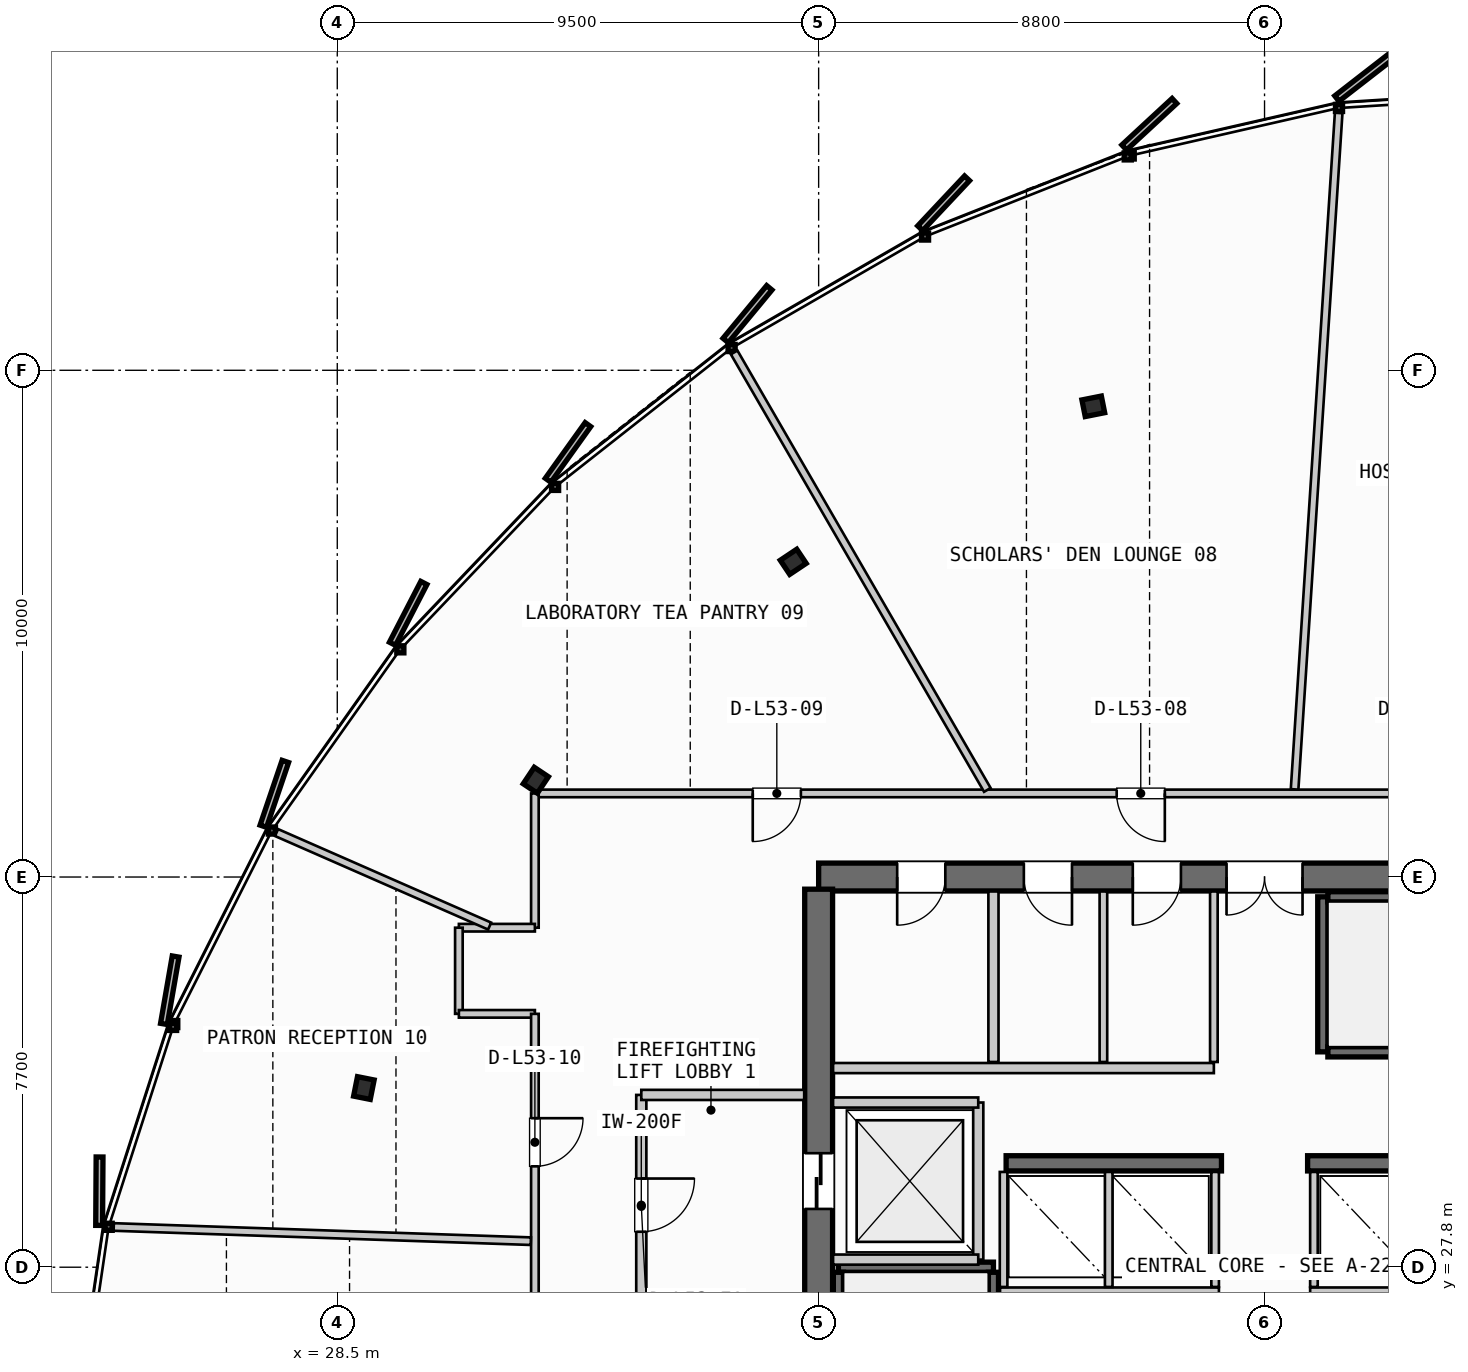
"""IFC4 building model, lengths in metres.
Left out: names, types, materials, properties, quantities, classifications, styles, units other than length and angle.
Written with IfcOpenShell. Run it as: python <this file> out.ifc"""

import sys

from ifc_helpers import new_model, si_unit, direction, frame, frame_2d, origin, origin_2d, place, context, subcontext, project, spatial, rectangle, i_section, extrude, source, transform, mapped, element, fill, save


model = new_model("IFC4")
c1 = context("Model", 3, precision=1e-05, world=origin(), true_north=direction((0.0, 1.0)))
c2 = subcontext(c1, "Body", "Model", "MODEL_VIEW")
j1 = project(units=[si_unit("LENGTHUNIT", "METRE"), si_unit("PLANEANGLEUNIT", "RADIAN")], contexts=[c1])
p1 = place(None, origin())
s1 = spatial("IfcSite", under=j1, at=p1, CompositionType="ELEMENT")
p2 = place(p1, origin())
s2 = spatial("IfcBuilding", under=s1, at=p2, CompositionType="ELEMENT")
p3 = place(p2, frame((0.0, 0.0, 204.4)))
s3 = spatial("IfcBuildingStorey", under=s2, at=p3, CompositionType="ELEMENT", Elevation=204.4)
p4 = place(p3, frame((55.6, 35.5, 0.0), z_axis=(0.0, 0.0, 1.0), x_axis=(-1.0, 0.0, 0.0)))
e1 = element("IfcWall", 1, at=p4, inside=s3, PredefinedType="SHEAR", context=c2, shape_type="SweptSolid", body=[
    extrude(rectangle(XDim=17.6, YDim=0.55, at=frame_2d((8.8, 0.0))), origin(), (0.0, 0.0, 1.0), 3.26),
])
p5 = place(p4, frame((8.05, 0.0, 0.0)))
e2 = element("IfcOpeningElement", 2, at=p5, cuts=e1, PredefinedType="OPENING", context=c2, shape_type="SweptSolid", body=[
    extrude(rectangle(XDim=1.5, YDim=2.2, at=frame_2d((0.75, 1.1))), frame((0.0, 0.285, 0.0), z_axis=(0.0, -1.0, 0.0), x_axis=(1.0, 0.0, 0.0)), (0.0, 0.0, 1.0), 0.57),
])
p6 = place(p4, frame((15.1, 0.0, 0.0)))
e3 = element("IfcOpeningElement", 3, at=p6, cuts=e1, PredefinedType="OPENING", context=c2, shape_type="SweptSolid", body=[
    extrude(rectangle(XDim=0.95, YDim=2.15, at=frame_2d((0.475, 1.075))), frame((0.0, 0.285, 0.0), z_axis=(0.0, -1.0, 0.0), x_axis=(1.0, 0.0, 0.0)), (0.0, 0.0, 1.0), 0.57),
])
p7 = place(p4, frame((12.6, 0.0, 0.0)))
e4 = element("IfcOpeningElement", 4, at=p7, cuts=e1, PredefinedType="OPENING", context=c2, shape_type="SweptSolid", body=[
    extrude(rectangle(XDim=0.95, YDim=2.15, at=frame_2d((0.475, 1.075))), frame((0.0, 0.285, 0.0), z_axis=(0.0, -1.0, 0.0), x_axis=(1.0, 0.0, 0.0)), (0.0, 0.0, 1.0), 0.57),
])
p8 = place(p4, frame((10.45, 0.0, 0.0)))
e5 = element("IfcOpeningElement", 5, at=p8, cuts=e1, PredefinedType="OPENING", context=c2, shape_type="SweptSolid", body=[
    extrude(rectangle(XDim=0.95, YDim=2.15, at=frame_2d((0.475, 1.075))), frame((0.0, 0.285, 0.0), z_axis=(0.0, -1.0, 0.0), x_axis=(1.0, 0.0, 0.0)), (0.0, 0.0, 1.0), 0.57),
])
p9 = place(p3, frame((38.0, 35.26, 0.0), z_axis=(0.0, 0.0, 1.0), x_axis=(0.0, -1.0, 0.0)))
e6 = element("IfcWall", 6, at=p9, inside=s3, PredefinedType="SHEAR", context=c2, shape_type="SweptSolid", body=[
    extrude(rectangle(XDim=14.92, YDim=0.55, at=frame_2d((7.46, 0.0))), origin(), (0.0, 0.0, 1.0), 3.26),
])
p10 = place(p9, frame((5.21, 0.0, 0.0)))
e7 = element("IfcOpeningElement", 7, at=p10, cuts=e6, PredefinedType="OPENING", context=c2, shape_type="SweptSolid", body=[
    extrude(rectangle(XDim=1.1, YDim=2.2, at=frame_2d((0.55, 1.1))), frame((0.0, 0.285, 0.0), z_axis=(0.0, -1.0, 0.0), x_axis=(1.0, 0.0, 0.0)), (0.0, 0.0, 1.0), 0.57),
])
for number, where, z_axis, x_axis in (
    (8, (41.7, 29.85, 0.0), (0.0, 0.0, 1.0), (1.0, 0.0, 0.0)),
    (9, (47.65, 29.85, 0.0), (0.0, 0.0, 1.0), (1.0, 0.0, 0.0)),
):
    element("IfcWall", number, at=place(p3, frame(where, z_axis=z_axis, x_axis=x_axis)), inside=s3, PredefinedType="SHEAR", context=c2, shape_type="SweptSolid", body=[
        extrude(rectangle(XDim=4.25, YDim=0.3, at=frame_2d((2.125, 0.0))), origin(), (0.0, 0.0, 1.0), 3.26),
    ])
m1 = source(origin(), c2, "Body", "SweptSolid", [
    extrude(i_section(OverallWidth=0.391, OverallDepth=0.335, WebThickness=0.023, FlangeThickness=0.034, FilletRadius=0.015, at=origin_2d()), origin(), (0.0, 0.0, 1.0), 3.26),
])
for number, where, z_axis, x_axis in (
    (10, (43.421, 44.789, 0.0), (0.0, 0.0, 1.0), (-0.195, 0.981, 0.0)),
    (11, (37.499, 41.72, 0.0), (0.0, 0.0, 1.0), (-0.556, 0.831, 0.0)),
    (12, (32.418, 37.409, 0.0), (0.0, 0.0, 1.0), (-0.831, 0.556, 0.0)),
    (13, (29.025, 31.336, 0.0), (0.0, 0.0, 1.0), (-0.981, 0.195, 0.0)),
):
    element("IfcColumn", number, at=place(p3, frame(where, z_axis=z_axis, x_axis=x_axis)), inside=s3, PredefinedType="COLUMN", context=c2, shape_type="MappedRepresentation", body=[
        mapped(m1, transform((0.0, 0.0, 0.0), scale=1.0)),
    ])
p11 = place(p3, frame((38.39, 27.8, 0.0), z_axis=(0.0, 0.0, 1.0), x_axis=(1.0, 0.0, 0.0)))
e14 = element("IfcWall", 14, at=p11, inside=s3, PredefinedType="SHEAR", context=c2, shape_type="SweptSolid", body=[
    extrude(rectangle(XDim=3.06, YDim=0.2, at=frame_2d((1.53, 0.0))), origin(), (0.0, 0.0, 1.0), 3.26),
])
for number, where, z_axis, x_axis in (
    (15, (41.45, 27.7, 0.0), (0.0, 0.0, 1.0), (0.0, -1.0, 0.0)),
    (16, (38.39, 20.35, 0.0), (0.0, 0.0, 1.0), (0.0, 1.0, 0.0)),
):
    element("IfcWall", number, at=place(p3, frame(where, z_axis=z_axis, x_axis=x_axis)), inside=s3, PredefinedType="SHEAR", context=c2, shape_type="SweptSolid", body=[
        extrude(rectangle(XDim=7.35, YDim=0.2, at=frame_2d((3.675, 0.0))), origin(), (0.0, 0.0, 1.0), 3.26),
    ])
p12 = place(p3, frame((47.95, 32.05, 0.0), z_axis=(0.0, 0.0, 1.0), x_axis=(0.0, 1.0, 0.0)))
e17 = element("IfcWall", 17, at=p12, inside=s3, PredefinedType="SHEAR", context=c2, shape_type="SweptSolid", body=[
    extrude(rectangle(XDim=3.06, YDim=0.2, at=frame_2d((1.53, 0.0))), origin(), (0.0, 0.0, 1.0), 3.26),
])
for number, where, z_axis, x_axis in (
    (18, (48.05, 35.11, 0.0), (0.0, 0.0, 1.0), (1.0, 0.0, 0.0)),
    (19, (55.4, 32.05, 0.0), (0.0, 0.0, 1.0), (-1.0, 0.0, 0.0)),
):
    element("IfcWall", number, at=place(p3, frame(where, z_axis=z_axis, x_axis=x_axis)), inside=s3, PredefinedType="SHEAR", context=c2, shape_type="SweptSolid", body=[
        extrude(rectangle(XDim=7.35, YDim=0.2, at=frame_2d((3.675, 0.0))), origin(), (0.0, 0.0, 1.0), 3.26),
    ])
p13 = place(p3, frame((41.15, 27.95, 0.0), z_axis=(0.0, 0.0, 1.0), x_axis=(0.0, 1.0, 0.0)))
e20 = element("IfcWall", 20, at=p13, inside=s3, PredefinedType="PARTITIONING", context=c2, shape_type="SweptSolid", body=[
    extrude(rectangle(XDim=3.1, YDim=0.2, at=frame_2d((1.55, 0.0))), origin(), (0.0, 0.0, 1.0), 2.595),
])
for number, where, z_axis, x_axis in (
    (21, (38.285, 27.95, 0.0), (0.0, 0.0, 1.0), (1.0, 0.0, 0.0)),
    (22, (38.285, 31.05, 0.0), (0.0, 0.0, 1.0), (1.0, 0.0, 0.0)),
):
    element("IfcWall", number, at=place(p3, frame(where, z_axis=z_axis, x_axis=x_axis)), inside=s3, PredefinedType="PARTITIONING", context=c2, shape_type="SweptSolid", body=[
        extrude(rectangle(XDim=2.865, YDim=0.2, at=frame_2d((1.433, 0.0))), origin(), (0.0, 0.0, 1.0), 2.595),
    ])
p14 = place(p3, frame((34.5, 31.2, 0.0), z_axis=(0.0, 0.0, 1.0), x_axis=(0.0, -1.0, 0.0)))
e23 = element("IfcWall", 23, at=p14, inside=s3, PredefinedType="PARTITIONING", context=c2, shape_type="SweptSolid", body=[
    extrude(rectangle(XDim=4.4, YDim=0.2, at=frame_2d((2.2, 0.0))), origin(), (0.0, 0.0, 1.0), 2.595),
])
p15 = place(p14, frame((1.65, 0.0, 0.0)))
e24 = element("IfcOpeningElement", 24, at=p15, cuts=e23, PredefinedType="OPENING", context=c2, shape_type="SweptSolid", body=[
    extrude(rectangle(XDim=1.05, YDim=2.15, at=frame_2d((0.525, 1.075))), frame((0.0, 0.11, 0.0), z_axis=(0.0, -1.0, 0.0), x_axis=(1.0, 0.0, 0.0)), (0.0, 0.0, 1.0), 0.22),
])
p16 = place(p3, frame((34.5, 31.2, 0.0), z_axis=(0.0, 0.0, 1.0), x_axis=(1.0, 0.0, 0.0)))
e25 = element("IfcWall", 25, at=p16, inside=s3, PredefinedType="PARTITIONING", context=c2, shape_type="SweptSolid", body=[
    extrude(rectangle(XDim=3.215, YDim=0.2, at=frame_2d((1.607, 0.0))), origin(), (0.0, 0.0, 1.0), 2.595),
])
p17 = place(p3, frame((41.58, 27.325, 0.0), z_axis=(0.0, 0.0, 1.0), x_axis=(1.0, 0.0, 0.0)))
e26 = element("IfcWall", 26, at=p17, inside=s3, PredefinedType="PARTITIONING", context=c2, shape_type="SweptSolid", body=[
    extrude(rectangle(XDim=4.32, YDim=0.15, at=frame_2d((2.16, 0.0))), origin(), (0.0, 0.0, 1.0), 2.595),
])
p18 = place(p3, frame((47.7, 27.325, 0.0), z_axis=(0.0, 0.0, 1.0), x_axis=(1.0, 0.0, 0.0)))
e27 = element("IfcWall", 27, at=p18, inside=s3, PredefinedType="PARTITIONING", context=c2, shape_type="SweptSolid", body=[
    extrude(rectangle(XDim=4.32, YDim=0.15, at=frame_2d((2.16, 0.0))), origin(), (0.0, 0.0, 1.0), 2.595),
])
for number, where, z_axis, x_axis in (
    (28, (41.65, 27.41, 0.0), (0.0, 0.0, 1.0), (0.0, 1.0, 0.0)),
    (29, (43.725, 27.41, 0.0), (0.0, 0.0, 1.0), (0.0, 1.0, 0.0)),
    (30, (45.825, 27.41, 0.0), (0.0, 0.0, 1.0), (0.0, 1.0, 0.0)),
    (31, (47.775, 27.41, 0.0), (0.0, 0.0, 1.0), (0.0, 1.0, 0.0)),
):
    element("IfcWall", number, at=place(p3, frame(where, z_axis=z_axis, x_axis=x_axis)), inside=s3, PredefinedType="PARTITIONING", context=c2, shape_type="SweptSolid", body=[
        extrude(rectangle(XDim=2.27, YDim=0.15, at=frame_2d((1.135, 0.0))), origin(), (0.0, 0.0, 1.0), 2.595),
    ])
p19 = place(p3, frame((41.45, 31.85, 0.0), z_axis=(0.0, 0.0, 1.0), x_axis=(0.0, 1.0, 0.0)))
e32 = element("IfcWall", 32, at=p19, inside=s3, PredefinedType="PARTITIONING", context=c2, shape_type="SweptSolid", body=[
    extrude(rectangle(XDim=3.365, YDim=0.2, at=frame_2d((1.683, 0.0))), origin(), (0.0, 0.0, 1.0), 2.595),
])
p20 = place(p3, frame((38.285, 31.73, 0.0), z_axis=(0.0, 0.0, 1.0), x_axis=(1.0, 0.0, 0.0)))
e33 = element("IfcWall", 33, at=p20, inside=s3, PredefinedType="PARTITIONING", context=c2, shape_type="SweptSolid", body=[
    extrude(rectangle(XDim=7.515, YDim=0.2, at=frame_2d((3.758, 0.0))), origin(), (0.0, 0.0, 1.0), 2.595),
])
p21 = place(p3, frame((45.8, 31.85, 0.0), z_axis=(0.0, 0.0, 1.0), x_axis=(0.0, 1.0, 0.0)))
e34 = element("IfcWall", 34, at=p21, inside=s3, PredefinedType="PARTITIONING", context=c2, shape_type="SweptSolid", body=[
    extrude(rectangle(XDim=3.365, YDim=0.15, at=frame_2d((1.683, 0.0))), origin(), (0.0, 0.0, 1.0), 2.595),
])
p22 = place(p3, frame((43.62, 31.85, 0.0), z_axis=(0.0, 0.0, 1.0), x_axis=(0.0, 1.0, 0.0)))
e35 = element("IfcWall", 35, at=p22, inside=s3, PredefinedType="PLUMBINGWALL", context=c2, shape_type="SweptSolid", body=[
    extrude(rectangle(XDim=3.365, YDim=0.15, at=frame_2d((1.683, 0.0))), origin(), (0.0, 0.0, 1.0), 2.595),
])
p23 = place(p3, frame((60.75, 37.15, 0.0), z_axis=(0.0, 0.0, 1.0), x_axis=(-1.0, 0.0, 0.0)))
e36 = element("IfcWall", 36, at=p23, inside=s3, PredefinedType="PARTITIONING", context=c2, shape_type="SweptSolid", body=[
    extrude(rectangle(XDim=28.35, YDim=0.15, at=frame_2d((14.175, 0.0))), origin(), (0.0, 0.0, 1.0), 2.595),
])
p24 = place(p23, frame((3.947, 0.0, 0.0)))
e37 = element("IfcOpeningElement", 37, at=p24, cuts=e36, PredefinedType="OPENING", context=c2, shape_type="SweptSolid", body=[
    extrude(rectangle(XDim=0.95, YDim=2.15, at=frame_2d((0.475, 1.075))), frame((0.0, 0.085, 0.0), z_axis=(0.0, -1.0, 0.0), x_axis=(1.0, 0.0, 0.0)), (0.0, 0.0, 1.0), 0.17),
])
p25 = place(p23, frame((10.314, 0.0, 0.0)))
e38 = element("IfcOpeningElement", 38, at=p25, cuts=e36, PredefinedType="OPENING", context=c2, shape_type="SweptSolid", body=[
    extrude(rectangle(XDim=0.95, YDim=2.15, at=frame_2d((0.475, 1.075))), frame((0.0, 0.085, 0.0), z_axis=(0.0, -1.0, 0.0), x_axis=(1.0, 0.0, 0.0)), (0.0, 0.0, 1.0), 0.17),
])
p26 = place(p23, frame((15.918, 0.0, 0.0)))
e39 = element("IfcOpeningElement", 39, at=p26, cuts=e36, PredefinedType="OPENING", context=c2, shape_type="SweptSolid", body=[
    extrude(rectangle(XDim=0.95, YDim=2.15, at=frame_2d((0.475, 1.075))), frame((0.0, 0.085, 0.0), z_axis=(0.0, -1.0, 0.0), x_axis=(1.0, 0.0, 0.0)), (0.0, 0.0, 1.0), 0.17),
])
p27 = place(p23, frame((23.1, 0.0, 0.0)))
e40 = element("IfcOpeningElement", 40, at=p27, cuts=e36, PredefinedType="OPENING", context=c2, shape_type="SweptSolid", body=[
    extrude(rectangle(XDim=0.95, YDim=2.15, at=frame_2d((0.475, 1.075))), frame((0.0, 0.085, 0.0), z_axis=(0.0, -1.0, 0.0), x_axis=(1.0, 0.0, 0.0)), (0.0, 0.0, 1.0), 0.17),
])
p28 = place(p3, frame((32.4, 37.15, 0.0), z_axis=(0.0, 0.0, 1.0), x_axis=(0.0, -1.0, 0.0)))
e41 = element("IfcWall", 41, at=p28, inside=s3, PredefinedType="PARTITIONING", context=c2, shape_type="SweptSolid", body=[
    extrude(rectangle(XDim=2.65, YDim=0.15, at=frame_2d((1.325, 0.0))), origin(), (0.0, 0.0, 1.0), 2.595),
])
p29 = place(p3, frame((32.4, 34.5, 0.0), z_axis=(0.0, 0.0, 1.0), x_axis=(-1.0, 0.0, 0.0)))
e42 = element("IfcWall", 42, at=p29, inside=s3, PredefinedType="PARTITIONING", context=c2, shape_type="SweptSolid", body=[
    extrude(rectangle(XDim=1.5, YDim=0.15, at=frame_2d((0.75, 0.0))), origin(), (0.0, 0.0, 1.0), 2.595),
])
p30 = place(p3, frame((30.9, 34.5, 0.0), z_axis=(0.0, 0.0, 1.0), x_axis=(0.0, -1.0, 0.0)))
e43 = element("IfcWall", 43, at=p30, inside=s3, PredefinedType="PARTITIONING", context=c2, shape_type="SweptSolid", body=[
    extrude(rectangle(XDim=1.7, YDim=0.15, at=frame_2d((0.85, 0.0))), origin(), (0.0, 0.0, 1.0), 2.595),
])
p31 = place(p3, frame((30.9, 32.8, 0.0), z_axis=(0.0, 0.0, 1.0), x_axis=(1.0, 0.0, 0.0)))
e44 = element("IfcWall", 44, at=p31, inside=s3, PredefinedType="PARTITIONING", context=c2, shape_type="SweptSolid", body=[
    extrude(rectangle(XDim=1.5, YDim=0.15, at=frame_2d((0.75, 0.0))), origin(), (0.0, 0.0, 1.0), 2.595),
])
p32 = place(p3, frame((32.4, 32.8, 0.0), z_axis=(0.0, 0.0, 1.0), x_axis=(0.0, -1.0, 0.0)))
e45 = element("IfcWall", 45, at=p32, inside=s3, PredefinedType="PARTITIONING", context=c2, shape_type="SweptSolid", body=[
    extrude(rectangle(XDim=10.0, YDim=0.15, at=frame_2d((5.0, 0.0))), origin(), (0.0, 0.0, 1.0), 2.595),
])
p33 = place(p32, frame((2.059, 0.0, 0.0)))
e46 = element("IfcOpeningElement", 46, at=p33, cuts=e45, PredefinedType="OPENING", context=c2, shape_type="SweptSolid", body=[
    extrude(rectangle(XDim=0.95, YDim=2.15, at=frame_2d((0.475, 1.075))), frame((0.0, 0.085, 0.0), z_axis=(0.0, -1.0, 0.0), x_axis=(1.0, 0.0, 0.0)), (0.0, 0.0, 1.0), 0.17),
])
p34 = place(p32, frame((6.479, 0.0, 0.0)))
e47 = element("IfcOpeningElement", 47, at=p34, cuts=e45, PredefinedType="OPENING", context=c2, shape_type="SweptSolid", body=[
    extrude(rectangle(XDim=0.95, YDim=2.15, at=frame_2d((0.475, 1.075))), frame((0.0, 0.085, 0.0), z_axis=(0.0, -1.0, 0.0), x_axis=(1.0, 0.0, 0.0)), (0.0, 0.0, 1.0), 0.17),
])
p35 = place(p3, frame((47.393, 37.23, 0.0), z_axis=(0.0, 0.0, 1.0), x_axis=(0.065049504942, 0.997882038072, 0.0)))
e48 = element("IfcWall", 48, at=p35, inside=s3, PredefinedType="PARTITIONING", context=c2, shape_type="SweptSolid", body=[
    extrude(rectangle(XDim=13.376, YDim=0.15, at=frame_2d((6.688, 0.0))), origin(), (0.0, 0.0, 1.0), 2.595),
])
p36 = place(p3, frame((41.33, 37.219, 0.0), z_axis=(0.0, 0.0, 1.0), x_axis=(-0.500938827378, 0.86548269262, 0.0)))
e49 = element("IfcWall", 49, at=p36, inside=s3, PredefinedType="PARTITIONING", context=c2, shape_type="SweptSolid", body=[
    extrude(rectangle(XDim=9.975, YDim=0.15, at=frame_2d((4.988, 0.0))), origin(), (0.0, 0.0, 1.0), 2.595),
])
p37 = place(p3, frame((31.507, 34.532, 0.0), z_axis=(0.0, 0.0, 1.0), x_axis=(-0.915717518103, 0.401822631318, 0.0)))
e50 = element("IfcWall", 50, at=p37, inside=s3, PredefinedType="PARTITIONING", context=c2, shape_type="SweptSolid", body=[
    extrude(rectangle(XDim=4.592, YDim=0.15, at=frame_2d((2.296, 0.0))), origin(), (0.0, 0.0, 1.0), 2.595),
])
p38 = place(p3, frame((32.32, 28.314, 0.0), z_axis=(0.0, 0.0, 1.0), x_axis=(-0.999420901032, 0.034027379868, 0.0)))
e51 = element("IfcWall", 51, at=p38, inside=s3, PredefinedType="PARTITIONING", context=c2, shape_type="SweptSolid", body=[
    extrude(rectangle(XDim=8.237, YDim=0.15, at=frame_2d((4.118, 0.0))), origin(), (0.0, 0.0, 1.0), 2.595),
])
m2 = source(origin(), c2, "Body", "SweptSolid", [
    extrude(rectangle(XDim=1.5, YDim=2.2, at=frame_2d((0.75, 1.1))), frame((0.0, 0.025, 0.0), z_axis=(0.0, -1.0, 0.0), x_axis=(1.0, 0.0, 0.0)), (0.0, 0.0, 1.0), 0.05),
])
p39 = place(p5, origin())
e52 = element("IfcDoor", 52, at=p39, inside=s3, OperationType="DOUBLE_DOOR_SINGLE_SWING", PredefinedType="DOOR", context=c2, shape_type="MappedRepresentation", body=[
    mapped(m2, transform((0.0, 0.0, 0.0), scale=1.0)),
])
fill(e2, e52)
m3 = source(origin(), c2, "Body", "SweptSolid", [
    extrude(rectangle(XDim=1.1, YDim=2.2, at=frame_2d((0.55, 1.1))), frame((0.0, 0.025, 0.0), z_axis=(0.0, -1.0, 0.0), x_axis=(1.0, 0.0, 0.0)), (0.0, 0.0, 1.0), 0.05),
])
p40 = place(p10, origin())
e53 = element("IfcDoor", 53, at=p40, inside=s3, OperationType="SLIDING_TO_LEFT", PredefinedType="DOOR", context=c2, shape_type="MappedRepresentation", body=[
    mapped(m3, transform((0.0, 0.0, 0.0), scale=1.0)),
])
fill(e7, e53)
m4 = source(origin(), c2, "Body", "SweptSolid", [
    extrude(rectangle(XDim=0.95, YDim=2.15, at=frame_2d((0.475, 1.075))), frame((0.0, 0.025, 0.0), z_axis=(0.0, -1.0, 0.0), x_axis=(1.0, 0.0, 0.0)), (0.0, 0.0, 1.0), 0.05),
])
p41 = place(p6, origin())
e54 = element("IfcDoor", 54, at=p41, inside=s3, OperationType="SINGLE_SWING_RIGHT", PredefinedType="DOOR", context=c2, shape_type="MappedRepresentation", body=[
    mapped(m4, transform((0.0, 0.0, 0.0), scale=1.0)),
])
fill(e3, e54)
p42 = place(p7, origin())
e55 = element("IfcDoor", 55, at=p42, inside=s3, OperationType="SINGLE_SWING_LEFT", PredefinedType="DOOR", context=c2, shape_type="MappedRepresentation", body=[
    mapped(m4, transform((0.0, 0.0, 0.0), scale=1.0)),
])
fill(e4, e55)
p43 = place(p8, origin())
e56 = element("IfcDoor", 56, at=p43, inside=s3, OperationType="SINGLE_SWING_RIGHT", PredefinedType="DOOR", context=c2, shape_type="MappedRepresentation", body=[
    mapped(m4, transform((0.0, 0.0, 0.0), scale=1.0)),
])
fill(e5, e56)
m5 = source(origin(), c2, "Body", "SweptSolid", [
    extrude(rectangle(XDim=1.05, YDim=2.15, at=frame_2d((0.525, 1.075))), frame((0.0, 0.025, 0.0), z_axis=(0.0, -1.0, 0.0), x_axis=(1.0, 0.0, 0.0)), (0.0, 0.0, 1.0), 0.05),
])
p44 = place(p15, origin())
e57 = element("IfcDoor", 57, at=p44, inside=s3, OperationType="SINGLE_SWING_LEFT", PredefinedType="DOOR", context=c2, shape_type="MappedRepresentation", body=[
    mapped(m5, transform((0.0, 0.0, 0.0), scale=1.0)),
])
fill(e24, e57)
p45 = place(p26, origin())
e58 = element("IfcDoor", 58, at=p45, inside=s3, OperationType="SINGLE_SWING_LEFT", PredefinedType="DOOR", context=c2, shape_type="MappedRepresentation", body=[
    mapped(m4, transform((0.0, 0.0, 0.0), scale=1.0)),
])
fill(e39, e58)
p46 = place(p27, origin())
e59 = element("IfcDoor", 59, at=p46, inside=s3, OperationType="SINGLE_SWING_RIGHT", PredefinedType="DOOR", context=c2, shape_type="MappedRepresentation", body=[
    mapped(m4, transform((0.0, 0.0, 0.0), scale=1.0)),
])
fill(e40, e59)
p47 = place(p33, origin())
e60 = element("IfcDoor", 60, at=p47, inside=s3, OperationType="SINGLE_SWING_LEFT", PredefinedType="DOOR", context=c2, shape_type="MappedRepresentation", body=[
    mapped(m4, transform((0.0, 0.0, 0.0), scale=1.0)),
])
fill(e46, e60)
save(model, sys.argv[1])
